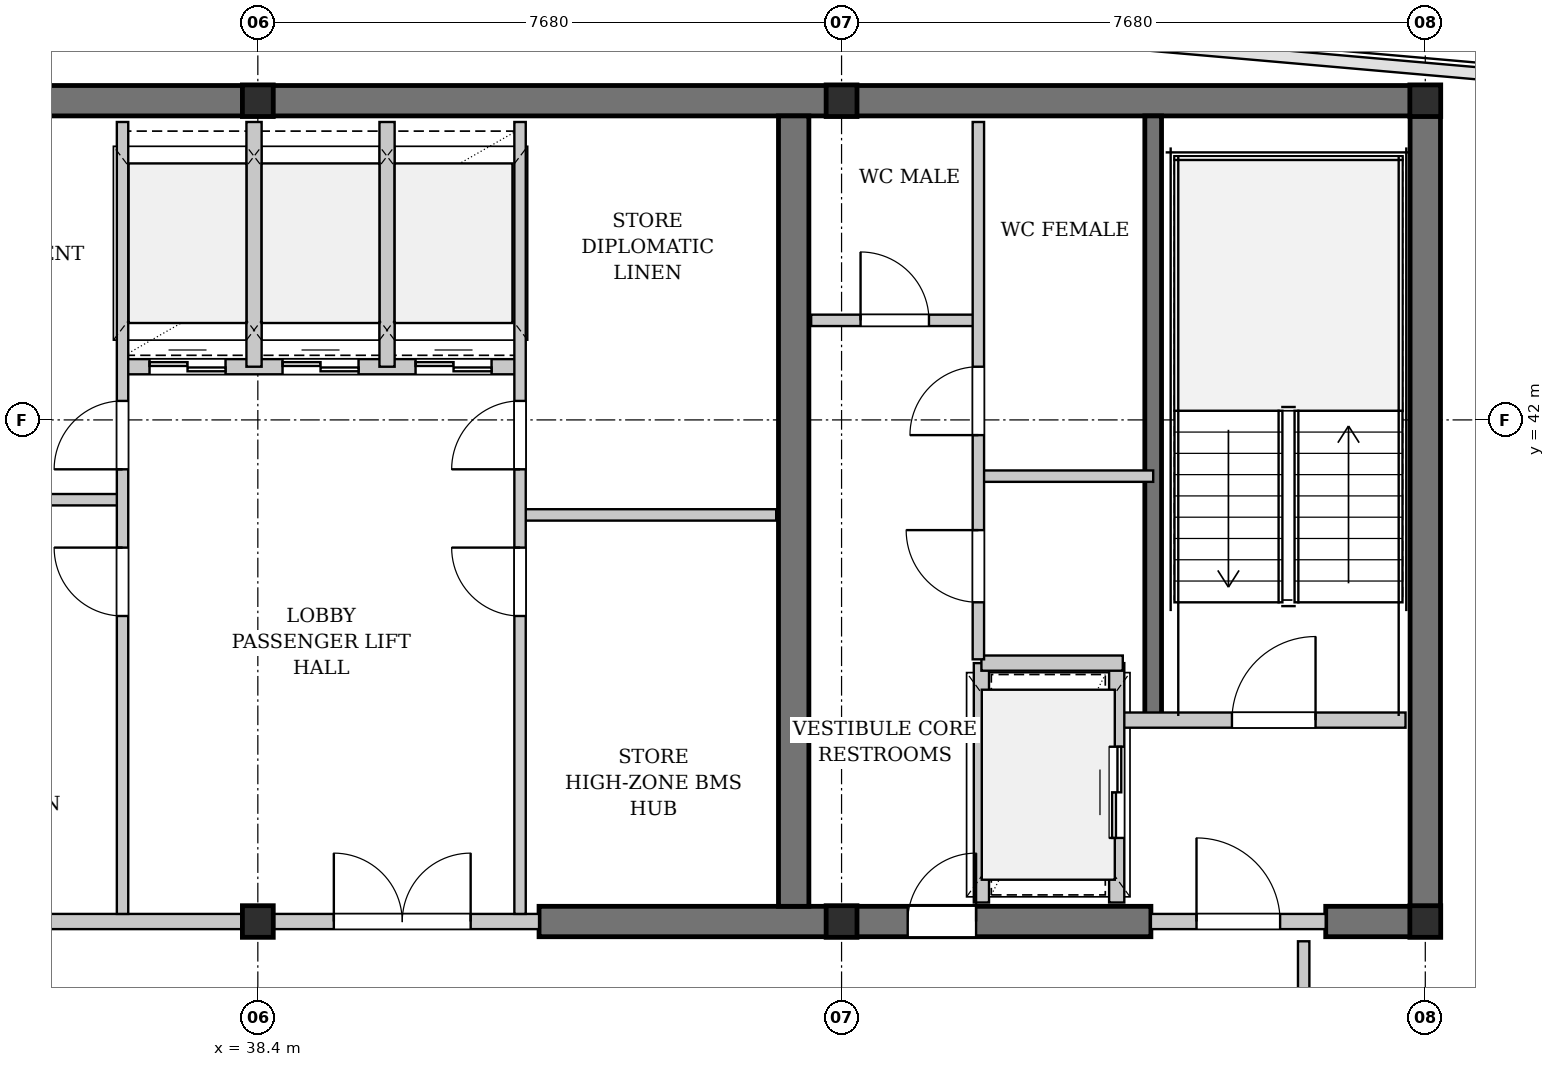
"""IFC4 building model, lengths in metres.
Left out: names, types, materials, properties, quantities, classifications, styles, units other than length and angle.
Written with IfcOpenShell. Run it as: python <this file> out.ifc"""

import sys

from ifc_helpers import new_model, si_unit, direction, frame, frame_2d, origin, origin_2d, place, context, subcontext, project, spatial, rectangle, i_section, extrude, element, fill, save


model = new_model("IFC4")
c1 = context("Model", 3, precision=1e-05, world=origin(), true_north=direction((0.0, 1.0)))
c2 = subcontext(c1, "Body", "Model", "MODEL_VIEW")
j1 = project(units=[si_unit("LENGTHUNIT", "METRE"), si_unit("PLANEANGLEUNIT", "RADIAN")], contexts=[c1])
p1 = place(None, origin())
s1 = spatial("IfcSite", under=j1, at=p1, CompositionType="ELEMENT")
p2 = place(p1, origin())
s2 = spatial("IfcBuilding", under=s1, at=p2, CompositionType="ELEMENT")
p3 = place(p2, frame((0.0, 0.0, 282.9)))
s3 = spatial("IfcBuildingStorey", under=s2, at=p3, CompositionType="ELEMENT", Elevation=282.9)
p4 = place(p3, frame((22.84, 46.2, 0.0), z_axis=(0.0, 0.0, 1.0), x_axis=(1.0, 0.0, 0.0)))
e1 = element("IfcWall", 1, at=p4, inside=s3, PredefinedType="SHEAR", context=c2, shape_type="SweptSolid", body=[
    extrude(rectangle(XDim=31.12, YDim=0.4, at=frame_2d((15.56, 0.0))), origin(), (0.0, 0.0, 1.0), 3.18),
])
p5 = place(p3, frame((42.1, 35.4, 0.0), z_axis=(0.0, 0.0, 1.0), x_axis=(1.0, 0.0, 0.0)))
e2 = element("IfcWall", 2, at=p5, inside=s3, PredefinedType="SHEAR", context=c2, shape_type="SweptSolid", body=[
    extrude(rectangle(XDim=8.05, YDim=0.4, at=frame_2d((4.025, 0.0))), origin(), (0.0, 0.0, 1.0), 3.18),
])
p6 = place(p5, frame((4.85, 0.0, 0.0)))
e3 = element("IfcOpeningElement", 3, at=p6, cuts=e2, PredefinedType="OPENING", context=c2, shape_type="SweptSolid", body=[
    extrude(rectangle(XDim=0.9, YDim=2.15, at=frame_2d((0.45, 1.075))), frame((0.0, 0.21, 0.0), z_axis=(0.0, -1.0, 0.0), x_axis=(1.0, 0.0, 0.0)), (0.0, 0.0, 1.0), 0.42),
])
p7 = place(p3, frame((52.45, 35.4, 0.0), z_axis=(0.0, 0.0, 1.0), x_axis=(1.0, 0.0, 0.0)))
e4 = element("IfcWall", 4, at=p7, inside=s3, PredefinedType="SHEAR", context=c2, shape_type="SweptSolid", body=[
    extrude(rectangle(XDim=1.51, YDim=0.4, at=frame_2d((0.755, 0.0))), origin(), (0.0, 0.0, 1.0), 3.18),
])
for number, where, z_axis, x_axis in (
    (5, (45.45, 35.6, 0.0), (0.0, 0.0, 1.0), (0.0, 1.0, 0.0)),
    (6, (53.76, 35.6, 0.0), (0.0, 0.0, 1.0), (0.0, 1.0, 0.0)),
):
    element("IfcWall", number, at=place(p3, frame(where, z_axis=z_axis, x_axis=x_axis)), inside=s3, PredefinedType="SHEAR", context=c2, shape_type="SweptSolid", body=[
        extrude(rectangle(XDim=10.4, YDim=0.4, at=frame_2d((5.2, 0.0))), origin(), (0.0, 0.0, 1.0), 3.18),
    ])
p8 = place(p3, frame((50.18, 38.05, 0.0), z_axis=(0.0, 0.0, 1.0), x_axis=(0.0, 1.0, 0.0)))
e7 = element("IfcWall", 7, at=p8, inside=s3, PredefinedType="SHEAR", context=c2, shape_type="SweptSolid", body=[
    extrude(rectangle(XDim=7.95, YDim=0.22, at=frame_2d((3.975, 0.0))), origin(), (0.0, 0.0, 1.0), 3.18),
])
for number, where, z_axis, x_axis in (
    (8, (38.4, 35.4, 0.0), (0.0, 0.0, 1.0), (1.0, 0.0, 0.0)),
    (9, (38.4, 46.2, 0.0), (0.0, 0.0, 1.0), (1.0, 0.0, 0.0)),
    (10, (46.08, 35.4, 0.0), (0.0, 0.0, 1.0), (1.0, 0.0, 0.0)),
    (11, (46.08, 46.2, 0.0), (0.0, 0.0, 1.0), (1.0, 0.0, 0.0)),
    (12, (53.76, 35.4, 0.0), (0.0, 0.0, 1.0), (1.0, 0.0, 0.0)),
    (13, (53.76, 46.2, 0.0), (0.0, 0.0, 1.0), (1.0, 0.0, 0.0)),
):
    element("IfcColumn", number, at=place(p3, frame(where, z_axis=z_axis, x_axis=x_axis)), inside=s3, PredefinedType="COLUMN", context=c2, shape_type="SweptSolid", body=[
        extrude(i_section(OverallWidth=0.406, OverallDepth=0.416, WebThickness=0.03, FlangeThickness=0.048, FilletRadius=0.015, at=origin_2d()), origin(), (0.0, 0.0, 1.0), 3.4),
    ])
p9 = place(p3, frame((35.6, 35.4, 0.0), z_axis=(0.0, 0.0, 1.0), x_axis=(1.0, 0.0, 0.0)))
e14 = element("IfcWall", 14, at=p9, inside=s3, PredefinedType="PARTITIONING", context=c2, shape_type="SweptSolid", body=[
    extrude(rectangle(XDim=6.5, YDim=0.2, at=frame_2d((3.25, 0.0))), origin(), (0.0, 0.0, 1.0), 2.575),
])
p10 = place(p9, frame((3.8, 0.0, 0.0)))
e15 = element("IfcOpeningElement", 15, at=p10, cuts=e14, PredefinedType="OPENING", context=c2, shape_type="SweptSolid", body=[
    extrude(rectangle(XDim=1.8, YDim=2.3, at=frame_2d((0.9, 1.15))), frame((0.0, 0.11, 0.0), z_axis=(0.0, -1.0, 0.0), x_axis=(1.0, 0.0, 0.0)), (0.0, 0.0, 1.0), 0.22),
])
p11 = place(p3, frame((36.6, 42.7, 0.0), z_axis=(0.0, 0.0, 1.0), x_axis=(1.0, 0.0, 0.0)))
e16 = element("IfcWall", 16, at=p11, inside=s3, PredefinedType="PARTITIONING", context=c2, shape_type="SweptSolid", body=[
    extrude(rectangle(XDim=5.25, YDim=0.2, at=frame_2d((2.625, 0.0))), origin(), (0.0, 0.0, 1.0), 3.18),
])
p12 = place(p11, frame((0.375, 0.0, 0.0)))
e17 = element("IfcOpeningElement", 17, at=p12, cuts=e16, PredefinedType="OPENING", context=c2, shape_type="SweptSolid", body=[
    extrude(rectangle(XDim=1.0, YDim=2.2, at=frame_2d((0.5, 1.1))), frame((0.0, 0.11, 0.0), z_axis=(0.0, -1.0, 0.0), x_axis=(1.0, 0.0, 0.0)), (0.0, 0.0, 1.0), 0.22),
])
p13 = place(p11, frame((2.125, 0.0, 0.0)))
e18 = element("IfcOpeningElement", 18, at=p13, cuts=e16, PredefinedType="OPENING", context=c2, shape_type="SweptSolid", body=[
    extrude(rectangle(XDim=1.0, YDim=2.2, at=frame_2d((0.5, 1.1))), frame((0.0, 0.11, 0.0), z_axis=(0.0, -1.0, 0.0), x_axis=(1.0, 0.0, 0.0)), (0.0, 0.0, 1.0), 0.22),
])
p14 = place(p11, frame((3.875, 0.0, 0.0)))
e19 = element("IfcOpeningElement", 19, at=p14, cuts=e16, PredefinedType="OPENING", context=c2, shape_type="SweptSolid", body=[
    extrude(rectangle(XDim=1.0, YDim=2.2, at=frame_2d((0.5, 1.1))), frame((0.0, 0.11, 0.0), z_axis=(0.0, -1.0, 0.0), x_axis=(1.0, 0.0, 0.0)), (0.0, 0.0, 1.0), 0.22),
])
p15 = place(p3, frame((38.35, 42.7, 0.0), z_axis=(0.0, 0.0, 1.0), x_axis=(0.0, 1.0, 0.0)))
e20 = element("IfcWall", 20, at=p15, inside=s3, PredefinedType="PARTITIONING", context=c2, shape_type="SweptSolid", body=[
    extrude(rectangle(XDim=3.22, YDim=0.2, at=frame_2d((1.61, 0.0))), origin(), (0.0, 0.0, 1.0), 2.575),
])
p16 = place(p3, frame((40.1, 42.7, 0.0), z_axis=(0.0, 0.0, 1.0), x_axis=(0.0, 1.0, 0.0)))
e21 = element("IfcWall", 21, at=p16, inside=s3, PredefinedType="PARTITIONING", context=c2, shape_type="SweptSolid", body=[
    extrude(rectangle(XDim=3.22, YDim=0.2, at=frame_2d((1.61, 0.0))), origin(), (0.0, 0.0, 1.0), 3.18),
])
p17 = place(p3, frame((33.05, 40.95, 0.0), z_axis=(0.0, 0.0, 1.0), x_axis=(1.0, 0.0, 0.0)))
e22 = element("IfcWall", 22, at=p17, inside=s3, PredefinedType="PARTITIONING", context=c2, shape_type="SweptSolid", body=[
    extrude(rectangle(XDim=3.57, YDim=0.15, at=frame_2d((1.785, 0.0))), origin(), (0.0, 0.0, 1.0), 3.18),
])
p18 = place(p3, frame((36.62, 35.5, 0.0), z_axis=(0.0, 0.0, 1.0), x_axis=(0.0, 1.0, 0.0)))
e23 = element("IfcWall", 23, at=p18, inside=s3, PredefinedType="PARTITIONING", context=c2, shape_type="SweptSolid", body=[
    extrude(rectangle(XDim=10.42, YDim=0.15, at=frame_2d((5.21, 0.0))), origin(), (0.0, 0.0, 1.0), 3.18),
])
p19 = place(p18, frame((3.92, 0.0, 0.0)))
e24 = element("IfcOpeningElement", 24, at=p19, cuts=e23, PredefinedType="OPENING", context=c2, shape_type="SweptSolid", body=[
    extrude(rectangle(XDim=0.9, YDim=2.15, at=frame_2d((0.45, 1.075))), frame((0.0, 0.085, 0.0), z_axis=(0.0, -1.0, 0.0), x_axis=(1.0, 0.0, 0.0)), (0.0, 0.0, 1.0), 0.17),
])
p20 = place(p18, frame((5.85, 0.0, 0.0)))
e25 = element("IfcOpeningElement", 25, at=p20, cuts=e23, PredefinedType="OPENING", context=c2, shape_type="SweptSolid", body=[
    extrude(rectangle(XDim=0.9, YDim=2.15, at=frame_2d((0.45, 1.075))), frame((0.0, 0.085, 0.0), z_axis=(0.0, -1.0, 0.0), x_axis=(1.0, 0.0, 0.0)), (0.0, 0.0, 1.0), 0.17),
])
p21 = place(p3, frame((41.85, 40.75, 0.0), z_axis=(0.0, 0.0, 1.0), x_axis=(1.0, 0.0, 0.0)))
e26 = element("IfcWall", 26, at=p21, inside=s3, PredefinedType="PARTITIONING", context=c2, shape_type="SweptSolid", body=[
    extrude(rectangle(XDim=3.37, YDim=0.15, at=frame_2d((1.685, 0.0))), origin(), (0.0, 0.0, 1.0), 3.18),
])
p22 = place(p3, frame((41.85, 35.5, 0.0), z_axis=(0.0, 0.0, 1.0), x_axis=(0.0, 1.0, 0.0)))
e27 = element("IfcWall", 27, at=p22, inside=s3, PredefinedType="PARTITIONING", context=c2, shape_type="SweptSolid", body=[
    extrude(rectangle(XDim=10.42, YDim=0.15, at=frame_2d((5.21, 0.0))), origin(), (0.0, 0.0, 1.0), 3.18),
])
p23 = place(p22, frame((3.92, 0.0, 0.0)))
e28 = element("IfcOpeningElement", 28, at=p23, cuts=e27, PredefinedType="OPENING", context=c2, shape_type="SweptSolid", body=[
    extrude(rectangle(XDim=0.9, YDim=2.15, at=frame_2d((0.45, 1.075))), frame((0.0, 0.085, 0.0), z_axis=(0.0, -1.0, 0.0), x_axis=(1.0, 0.0, 0.0)), (0.0, 0.0, 1.0), 0.17),
])
p24 = place(p22, frame((5.85, 0.0, 0.0)))
e29 = element("IfcOpeningElement", 29, at=p24, cuts=e27, PredefinedType="OPENING", context=c2, shape_type="SweptSolid", body=[
    extrude(rectangle(XDim=0.9, YDim=2.15, at=frame_2d((0.45, 1.075))), frame((0.0, 0.085, 0.0), z_axis=(0.0, -1.0, 0.0), x_axis=(1.0, 0.0, 0.0)), (0.0, 0.0, 1.0), 0.17),
])
p25 = place(p3, frame((49.78, 38.05, 0.0), z_axis=(0.0, 0.0, 1.0), x_axis=(1.0, 0.0, 0.0)))
e30 = element("IfcWall", 30, at=p25, inside=s3, PredefinedType="PARTITIONING", context=c2, shape_type="SweptSolid", body=[
    extrude(rectangle(XDim=3.72, YDim=0.2, at=frame_2d((1.86, 0.0))), origin(), (0.0, 0.0, 1.0), 3.18),
])
p26 = place(p25, frame((1.436, 0.0, 0.0)))
e31 = element("IfcOpeningElement", 31, at=p26, cuts=e30, PredefinedType="OPENING", context=c2, shape_type="SweptSolid", body=[
    extrude(rectangle(XDim=1.1, YDim=2.15, at=frame_2d((0.55, 1.075))), frame((0.0, 0.11, 0.0), z_axis=(0.0, -1.0, 0.0), x_axis=(1.0, 0.0, 0.0)), (0.0, 0.0, 1.0), 0.22),
])
p27 = place(p3, frame((50.15, 35.4, 0.0), z_axis=(0.0, 0.0, 1.0), x_axis=(1.0, 0.0, 0.0)))
e32 = element("IfcWall", 32, at=p27, inside=s3, PredefinedType="PARTITIONING", context=c2, shape_type="SweptSolid", body=[
    extrude(rectangle(XDim=2.3, YDim=0.2, at=frame_2d((1.15, 0.0))), origin(), (0.0, 0.0, 1.0), 2.575),
])
p28 = place(p27, frame((0.6, 0.0, 0.0)))
e33 = element("IfcOpeningElement", 33, at=p28, cuts=e32, PredefinedType="OPENING", context=c2, shape_type="SweptSolid", body=[
    extrude(rectangle(XDim=1.1, YDim=2.15, at=frame_2d((0.55, 1.075))), frame((0.0, 0.11, 0.0), z_axis=(0.0, -1.0, 0.0), x_axis=(1.0, 0.0, 0.0)), (0.0, 0.0, 1.0), 0.22),
])
p29 = place(p3, frame((49.7, 35.65, 0.0), z_axis=(0.0, 0.0, 1.0), x_axis=(0.0, 1.0, 0.0)))
e34 = element("IfcWall", 34, at=p29, inside=s3, PredefinedType="PARTITIONING", context=c2, shape_type="SweptSolid", body=[
    extrude(rectangle(XDim=3.15, YDim=0.2, at=frame_2d((1.575, 0.0))), origin(), (0.0, 0.0, 1.0), 3.18),
])
p30 = place(p29, frame((0.85, 0.0, 0.0)))
e35 = element("IfcOpeningElement", 35, at=p30, cuts=e34, PredefinedType="OPENING", context=c2, shape_type="SweptSolid", body=[
    extrude(rectangle(XDim=1.2, YDim=2.2, at=frame_2d((0.6, 1.1))), frame((0.0, 0.11, 0.0), z_axis=(0.0, -1.0, 0.0), x_axis=(1.0, 0.0, 0.0)), (0.0, 0.0, 1.0), 0.22),
])
p31 = place(p3, frame((47.92, 35.65, 0.0), z_axis=(0.0, 0.0, 1.0), x_axis=(0.0, 1.0, 0.0)))
e36 = element("IfcWall", 36, at=p31, inside=s3, PredefinedType="PARTITIONING", context=c2, shape_type="SweptSolid", body=[
    extrude(rectangle(XDim=3.15, YDim=0.2, at=frame_2d((1.575, 0.0))), origin(), (0.0, 0.0, 1.0), 3.18),
])
p32 = place(p3, frame((47.92, 38.8, 0.0), z_axis=(0.0, 0.0, 1.0), x_axis=(1.0, 0.0, 0.0)))
e37 = element("IfcWall", 37, at=p32, inside=s3, PredefinedType="PARTITIONING", context=c2, shape_type="SweptSolid", body=[
    extrude(rectangle(XDim=1.86, YDim=0.2, at=frame_2d((0.93, 0.0))), origin(), (0.0, 0.0, 1.0), 3.18),
])
p33 = place(p3, frame((45.68, 43.31, 0.0), z_axis=(0.0, 0.0, 1.0), x_axis=(1.0, 0.0, 0.0)))
e38 = element("IfcWall", 38, at=p33, inside=s3, PredefinedType="PARTITIONING", context=c2, shape_type="SweptSolid", body=[
    extrude(rectangle(XDim=2.2, YDim=0.15, at=frame_2d((1.1, 0.0))), origin(), (0.0, 0.0, 1.0), 3.18),
])
p34 = place(p33, frame((0.65, 0.0, 0.0)))
e39 = element("IfcOpeningElement", 39, at=p34, cuts=e38, PredefinedType="OPENING", context=c2, shape_type="SweptSolid", body=[
    extrude(rectangle(XDim=0.9, YDim=2.15, at=frame_2d((0.45, 1.075))), frame((0.0, 0.085, 0.0), z_axis=(0.0, -1.0, 0.0), x_axis=(1.0, 0.0, 0.0)), (0.0, 0.0, 1.0), 0.17),
])
p35 = place(p3, frame((47.88, 41.26, 0.0), z_axis=(0.0, 0.0, 1.0), x_axis=(1.0, 0.0, 0.0)))
e40 = element("IfcWall", 40, at=p35, inside=s3, PredefinedType="PARTITIONING", context=c2, shape_type="SweptSolid", body=[
    extrude(rectangle(XDim=2.3, YDim=0.15, at=frame_2d((1.15, 0.0))), origin(), (0.0, 0.0, 1.0), 3.18),
])
p36 = place(p3, frame((47.88, 38.85, 0.0), z_axis=(0.0, 0.0, 1.0), x_axis=(0.0, 1.0, 0.0)))
e41 = element("IfcWall", 41, at=p36, inside=s3, PredefinedType="PARTITIONING", context=c2, shape_type="SweptSolid", body=[
    extrude(rectangle(XDim=7.07, YDim=0.15, at=frame_2d((3.535, 0.0))), origin(), (0.0, 0.0, 1.0), 3.18),
])
p37 = place(p36, frame((0.75, 0.0, 0.0)))
e42 = element("IfcOpeningElement", 42, at=p37, cuts=e41, PredefinedType="OPENING", context=c2, shape_type="SweptSolid", body=[
    extrude(rectangle(XDim=0.95, YDim=2.15, at=frame_2d((0.475, 1.075))), frame((0.0, 0.085, 0.0), z_axis=(0.0, -1.0, 0.0), x_axis=(1.0, 0.0, 0.0)), (0.0, 0.0, 1.0), 0.17),
])
p38 = place(p36, frame((2.95, 0.0, 0.0)))
e43 = element("IfcOpeningElement", 43, at=p38, cuts=e41, PredefinedType="OPENING", context=c2, shape_type="SweptSolid", body=[
    extrude(rectangle(XDim=0.9, YDim=2.15, at=frame_2d((0.45, 1.075))), frame((0.0, 0.085, 0.0), z_axis=(0.0, -1.0, 0.0), x_axis=(1.0, 0.0, 0.0)), (0.0, 0.0, 1.0), 0.17),
])
p39 = place(p3, frame((52.16, 23.85, 0.0), z_axis=(0.0, 0.0, 1.0), x_axis=(0.0, 1.0, 0.0)))
e44 = element("IfcWall", 44, at=p39, inside=s3, PredefinedType="PARTITIONING", context=c2, shape_type="SweptSolid", body=[
    extrude(rectangle(XDim=11.29, YDim=0.15, at=frame_2d((5.645, 0.0))), origin(), (0.0, 0.0, 1.0), 3.18),
])
p40 = place(p39, frame((0.3, 0.0, 0.0)))
e45 = element("IfcOpeningElement", 45, at=p40, cuts=e44, PredefinedType="OPENING", context=c2, shape_type="SweptSolid", body=[
    extrude(rectangle(XDim=0.9, YDim=2.15, at=frame_2d((0.45, 1.075))), frame((0.0, 0.085, 0.0), z_axis=(0.0, -1.0, 0.0), x_axis=(1.0, 0.0, 0.0)), (0.0, 0.0, 1.0), 0.17),
])
p41 = place(p10, origin())
e46 = element("IfcDoor", 46, at=p41, inside=s3, OperationType="DOUBLE_DOOR_SINGLE_SWING", PredefinedType="DOOR", context=c2, shape_type="SweptSolid", body=[
    extrude(rectangle(XDim=1.8, YDim=2.3, at=frame_2d((0.9, 1.15))), frame((0.0, 0.025, 0.0), z_axis=(0.0, -1.0, 0.0), x_axis=(1.0, 0.0, 0.0)), (0.0, 0.0, 1.0), 0.05),
])
fill(e15, e46)
p42 = place(p12, origin())
e47 = element("IfcDoor", 47, at=p42, inside=s3, OperationType="DOUBLE_DOOR_SLIDING", PredefinedType="DOOR", context=c2, shape_type="SweptSolid", body=[
    extrude(rectangle(XDim=1.0, YDim=2.2, at=frame_2d((0.5, 1.1))), frame((0.0, 0.025, 0.0), z_axis=(0.0, -1.0, 0.0), x_axis=(1.0, 0.0, 0.0)), (0.0, 0.0, 1.0), 0.05),
])
fill(e17, e47)
p43 = place(p13, origin())
e48 = element("IfcDoor", 48, at=p43, inside=s3, OperationType="DOUBLE_DOOR_SLIDING", PredefinedType="DOOR", context=c2, shape_type="SweptSolid", body=[
    extrude(rectangle(XDim=1.0, YDim=2.2, at=frame_2d((0.5, 1.1))), frame((0.0, 0.025, 0.0), z_axis=(0.0, -1.0, 0.0), x_axis=(1.0, 0.0, 0.0)), (0.0, 0.0, 1.0), 0.05),
])
fill(e18, e48)
p44 = place(p14, origin())
e49 = element("IfcDoor", 49, at=p44, inside=s3, OperationType="DOUBLE_DOOR_SLIDING", PredefinedType="DOOR", context=c2, shape_type="SweptSolid", body=[
    extrude(rectangle(XDim=1.0, YDim=2.2, at=frame_2d((0.5, 1.1))), frame((0.0, 0.025, 0.0), z_axis=(0.0, -1.0, 0.0), x_axis=(1.0, 0.0, 0.0)), (0.0, 0.0, 1.0), 0.05),
])
fill(e19, e49)
p45 = place(p19, origin())
e50 = element("IfcDoor", 50, at=p45, inside=s3, OperationType="SINGLE_SWING_RIGHT", PredefinedType="DOOR", context=c2, shape_type="SweptSolid", body=[
    extrude(rectangle(XDim=0.9, YDim=2.15, at=frame_2d((0.45, 1.075))), frame((0.0, 0.025, 0.0), z_axis=(0.0, -1.0, 0.0), x_axis=(1.0, 0.0, 0.0)), (0.0, 0.0, 1.0), 0.05),
])
fill(e24, e50)
p46 = place(p20, origin())
e51 = element("IfcDoor", 51, at=p46, inside=s3, OperationType="SINGLE_SWING_LEFT", PredefinedType="DOOR", context=c2, shape_type="SweptSolid", body=[
    extrude(rectangle(XDim=0.9, YDim=2.15, at=frame_2d((0.45, 1.075))), frame((0.0, 0.025, 0.0), z_axis=(0.0, -1.0, 0.0), x_axis=(1.0, 0.0, 0.0)), (0.0, 0.0, 1.0), 0.05),
])
fill(e25, e51)
p47 = place(p23, origin())
e52 = element("IfcDoor", 52, at=p47, inside=s3, OperationType="SINGLE_SWING_RIGHT", PredefinedType="DOOR", context=c2, shape_type="SweptSolid", body=[
    extrude(rectangle(XDim=0.9, YDim=2.15, at=frame_2d((0.45, 1.075))), frame((0.0, 0.025, 0.0), z_axis=(0.0, -1.0, 0.0), x_axis=(1.0, 0.0, 0.0)), (0.0, 0.0, 1.0), 0.05),
])
fill(e28, e52)
p48 = place(p24, origin())
e53 = element("IfcDoor", 53, at=p48, inside=s3, OperationType="SINGLE_SWING_LEFT", PredefinedType="DOOR", context=c2, shape_type="SweptSolid", body=[
    extrude(rectangle(XDim=0.9, YDim=2.15, at=frame_2d((0.45, 1.075))), frame((0.0, 0.025, 0.0), z_axis=(0.0, -1.0, 0.0), x_axis=(1.0, 0.0, 0.0)), (0.0, 0.0, 1.0), 0.05),
])
fill(e29, e53)
p49 = place(p26, origin())
e54 = element("IfcDoor", 54, at=p49, inside=s3, OperationType="SINGLE_SWING_RIGHT", PredefinedType="DOOR", context=c2, shape_type="SweptSolid", body=[
    extrude(rectangle(XDim=1.1, YDim=2.15, at=frame_2d((0.55, 1.075))), frame((0.0, 0.025, 0.0), z_axis=(0.0, -1.0, 0.0), x_axis=(1.0, 0.0, 0.0)), (0.0, 0.0, 1.0), 0.05),
])
fill(e31, e54)
p50 = place(p28, origin())
e55 = element("IfcDoor", 55, at=p50, inside=s3, OperationType="SINGLE_SWING_LEFT", PredefinedType="DOOR", context=c2, shape_type="SweptSolid", body=[
    extrude(rectangle(XDim=1.1, YDim=2.15, at=frame_2d((0.55, 1.075))), frame((0.0, 0.025, 0.0), z_axis=(0.0, -1.0, 0.0), x_axis=(1.0, 0.0, 0.0)), (0.0, 0.0, 1.0), 0.05),
])
fill(e33, e55)
p51 = place(p30, origin())
e56 = element("IfcDoor", 56, at=p51, inside=s3, OperationType="DOUBLE_DOOR_SLIDING", PredefinedType="DOOR", context=c2, shape_type="SweptSolid", body=[
    extrude(rectangle(XDim=1.2, YDim=2.2, at=frame_2d((0.6, 1.1))), frame((0.0, 0.025, 0.0), z_axis=(0.0, -1.0, 0.0), x_axis=(1.0, 0.0, 0.0)), (0.0, 0.0, 1.0), 0.05),
])
fill(e35, e56)
p52 = place(p34, origin())
e57 = element("IfcDoor", 57, at=p52, inside=s3, OperationType="SINGLE_SWING_LEFT", PredefinedType="DOOR", context=c2, shape_type="SweptSolid", body=[
    extrude(rectangle(XDim=0.9, YDim=2.15, at=frame_2d((0.45, 1.075))), frame((0.0, 0.025, 0.0), z_axis=(0.0, -1.0, 0.0), x_axis=(1.0, 0.0, 0.0)), (0.0, 0.0, 1.0), 0.05),
])
fill(e39, e57)
p53 = place(p37, origin())
e58 = element("IfcDoor", 58, at=p53, inside=s3, OperationType="SINGLE_SWING_RIGHT", PredefinedType="DOOR", context=c2, shape_type="SweptSolid", body=[
    extrude(rectangle(XDim=0.95, YDim=2.15, at=frame_2d((0.475, 1.075))), frame((0.0, 0.025, 0.0), z_axis=(0.0, -1.0, 0.0), x_axis=(1.0, 0.0, 0.0)), (0.0, 0.0, 1.0), 0.05),
])
fill(e42, e58)
p54 = place(p38, origin())
e59 = element("IfcDoor", 59, at=p54, inside=s3, OperationType="SINGLE_SWING_LEFT", PredefinedType="DOOR", context=c2, shape_type="SweptSolid", body=[
    extrude(rectangle(XDim=0.9, YDim=2.15, at=frame_2d((0.45, 1.075))), frame((0.0, 0.025, 0.0), z_axis=(0.0, -1.0, 0.0), x_axis=(1.0, 0.0, 0.0)), (0.0, 0.0, 1.0), 0.05),
])
fill(e43, e59)
p55 = place(p6, origin())
e60 = element("IfcDoor", 60, at=p55, inside=s3, OperationType="SINGLE_SWING_RIGHT", PredefinedType="DOOR", context=c2, shape_type="SweptSolid", body=[
    extrude(rectangle(XDim=0.9, YDim=2.15, at=frame_2d((0.45, 1.075))), frame((0.0, 0.025, 0.0), z_axis=(0.0, -1.0, 0.0), x_axis=(1.0, 0.0, 0.0)), (0.0, 0.0, 1.0), 0.05),
])
fill(e3, e60)
save(model, sys.argv[1])
